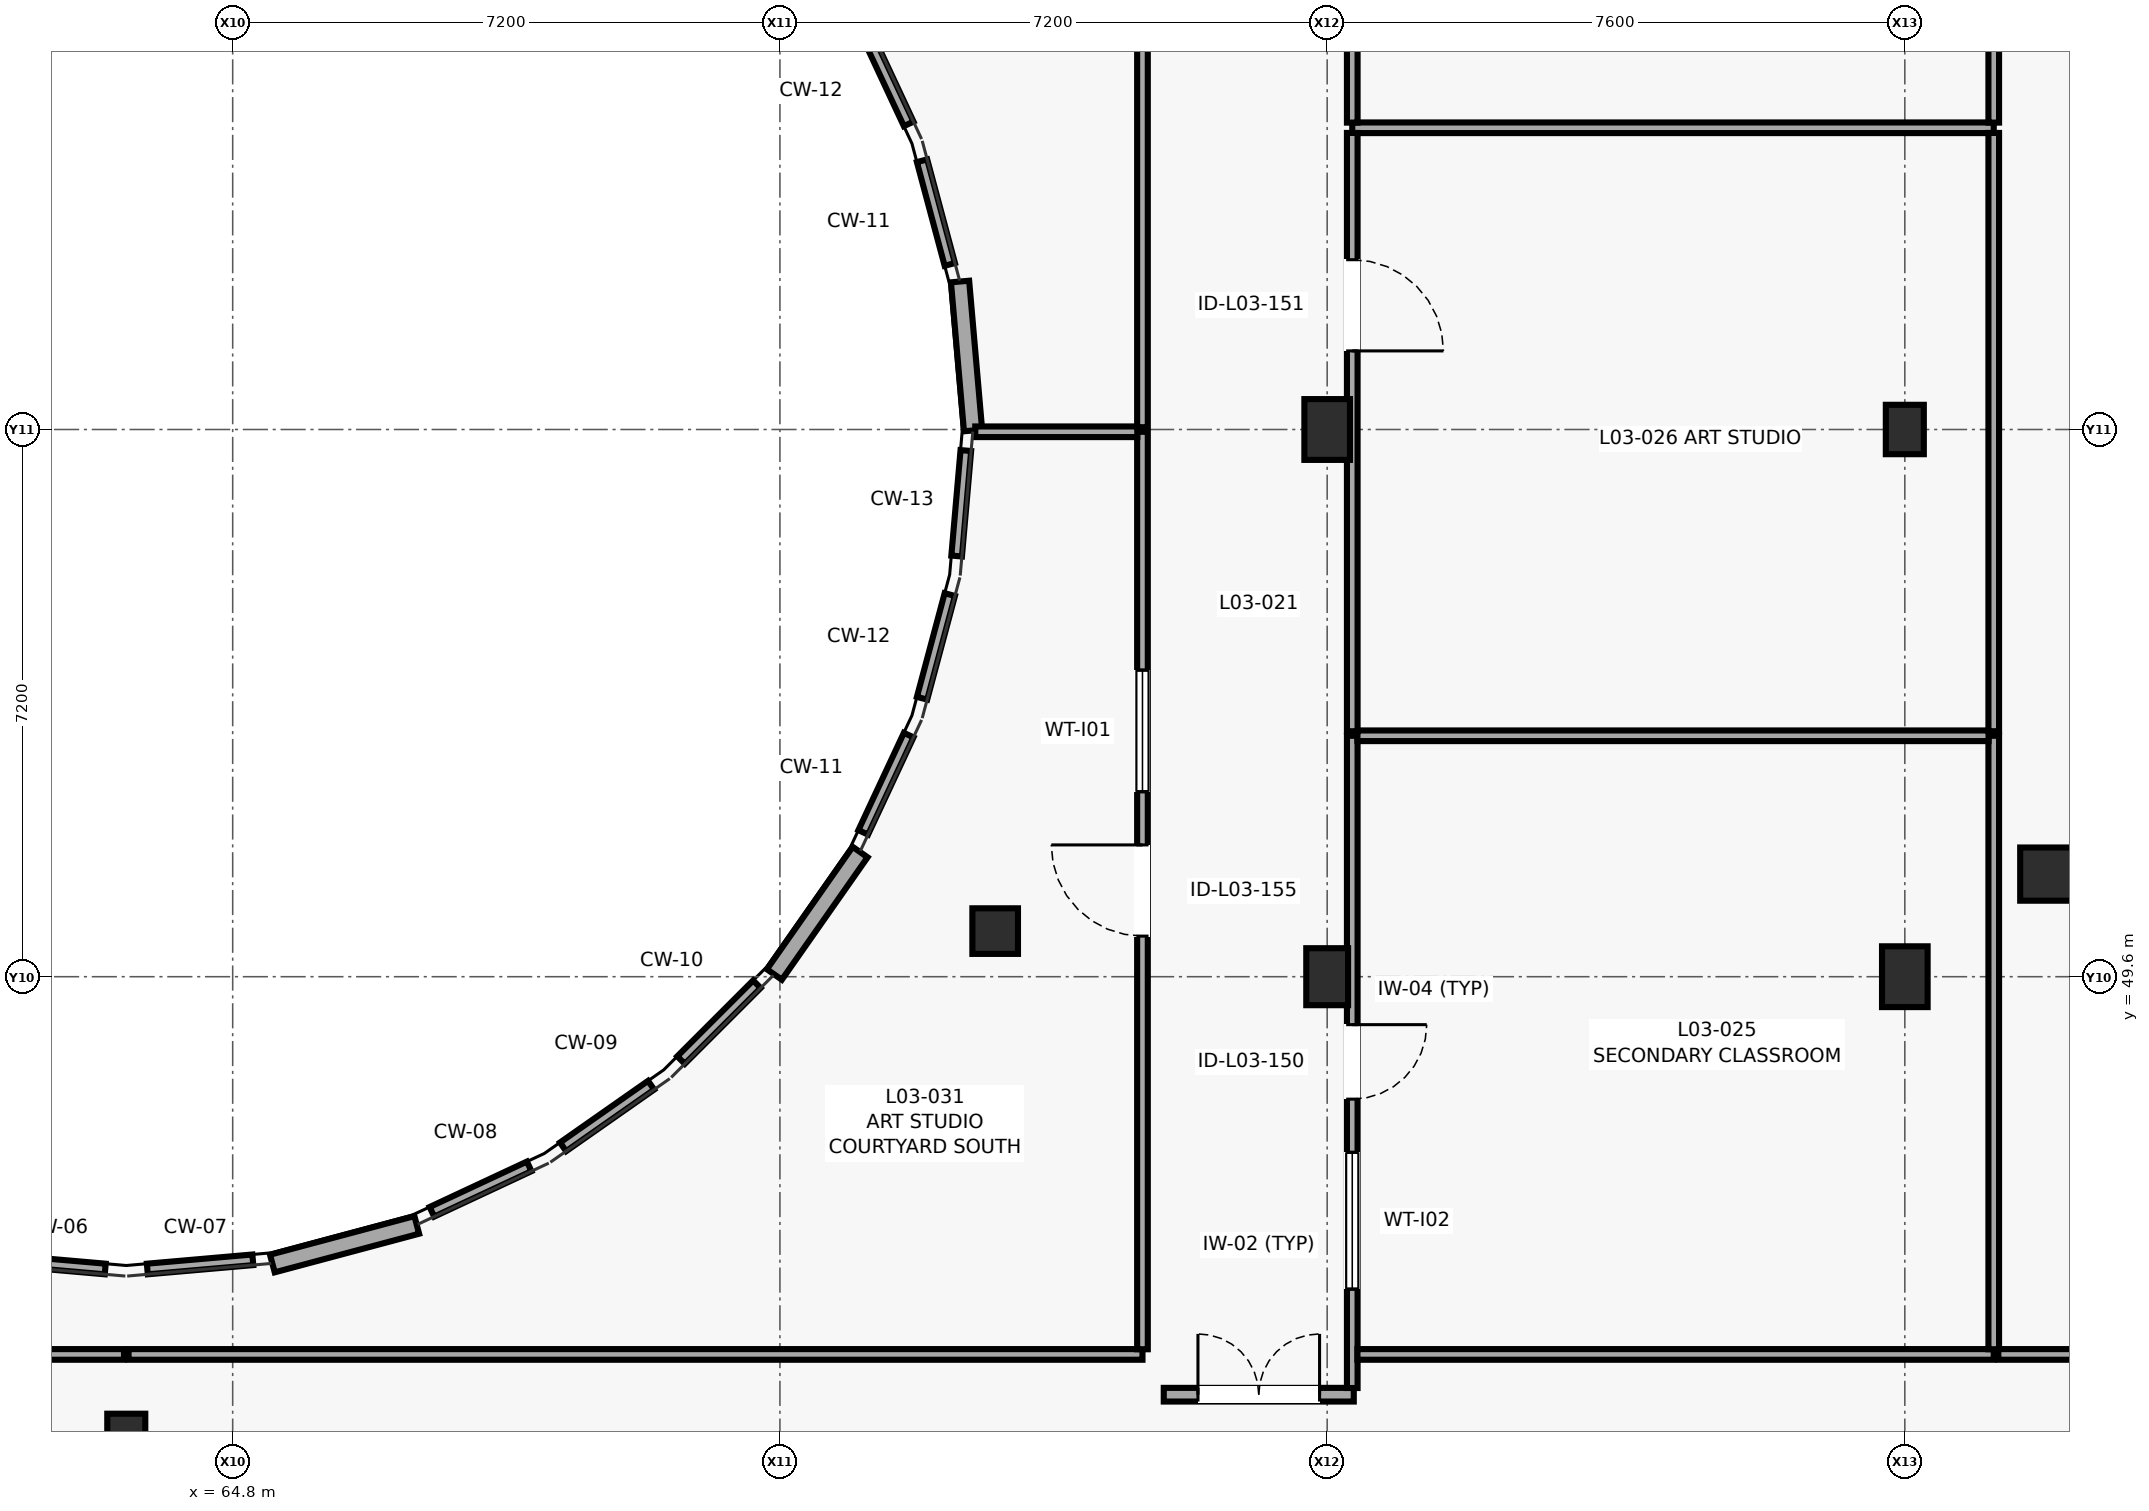
"""IFC4 building model, lengths in metres.
Left out: names, types, materials, properties, quantities, classifications, styles, units other than length and angle.
Written with IfcOpenShell. Run it as: python <this file> out.ifc"""

import sys

from ifc_helpers import new_model, si_unit, direction, frame, frame_2d, origin, origin_2d, place, context, subcontext, project, spatial, rectangle, circle, extrude, element, fill, save


model = new_model("IFC4")
c1 = context("Model", 3, precision=1e-05, world=origin(), true_north=direction((0.0, 1.0)))
c2 = subcontext(c1, "Body", "Model", "MODEL_VIEW")
j1 = project(units=[si_unit("LENGTHUNIT", "METRE"), si_unit("PLANEANGLEUNIT", "RADIAN")], contexts=[c1])
p1 = place(None, origin())
s1 = spatial("IfcSite", under=j1, at=p1, CompositionType="ELEMENT")
p2 = place(p1, origin())
s2 = spatial("IfcBuilding", under=s1, at=p2, CompositionType="ELEMENT")
p3 = place(p2, frame((0.0, 0.0, 12.2)))
s3 = spatial("IfcBuildingStorey", under=s2, at=p3, CompositionType="ELEMENT", Elevation=12.2)
p4 = place(p3, frame((63.4, 43.6, 0.0), z_axis=(0.0, 0.0, 1.0), x_axis=(1.0, 0.0, 0.0)))
e1 = element("IfcColumn", 1, at=p4, inside=s3, PredefinedType="COLUMN", context=c2, shape_type="SweptSolid", body=[
    extrude(circle(Radius=0.25, at=origin_2d()), origin(), (0.0, 0.0, 1.0), 4.0),
])
p5 = place(p3, frame((74.832, 50.2, 0.0), z_axis=(0.0, 0.0, 1.0), x_axis=(1.0, 0.0, 0.0)))
e2 = element("IfcColumn", 2, at=p5, inside=s3, PredefinedType="COLUMN", context=c2, shape_type="SweptSolid", body=[
    extrude(circle(Radius=0.3, at=origin_2d()), origin(), (0.0, 0.0, 1.0), 4.0),
])
p6 = place(p3, frame((79.2, 49.6, 0.0), z_axis=(0.0, 0.0, 1.0), x_axis=(1.0, 0.0, 0.0)))
e3 = element("IfcColumn", 3, at=p6, inside=s3, PredefinedType="COLUMN", context=c2, shape_type="SweptSolid", body=[
    extrude(rectangle(XDim=0.55, YDim=0.75, at=origin_2d()), origin(), (0.0, 0.0, 1.0), 4.0),
])
for number, where, z_axis, x_axis in (
    (4, (79.2, 56.8, 0.0), (0.0, 0.0, 1.0), (1.0, 0.0, 0.0)),
    (5, (86.8, 49.6, 0.0), (0.0, 0.0, 1.0), (1.0, 0.0, 0.0)),
):
    element("IfcColumn", number, at=place(p3, frame(where, z_axis=z_axis, x_axis=x_axis)), inside=s3, PredefinedType="COLUMN", context=c2, shape_type="SweptSolid", body=[
        extrude(rectangle(XDim=0.6, YDim=0.8, at=origin_2d()), origin(), (0.0, 0.0, 1.0), 4.0),
    ])
p7 = place(p3, frame((86.8, 56.8, 0.0), z_axis=(0.0, 0.0, 1.0), x_axis=(1.0, 0.0, 0.0)))
e6 = element("IfcColumn", 6, at=p7, inside=s3, PredefinedType="COLUMN", context=c2, shape_type="SweptSolid", body=[
    extrude(rectangle(XDim=0.5, YDim=0.65, at=origin_2d()), origin(), (0.0, 0.0, 1.0), 4.0),
])
p8 = place(p3, frame((88.668, 50.95, 0.0), z_axis=(0.0, 0.0, 1.0), x_axis=(1.0, 0.0, 0.0)))
e7 = element("IfcColumn", 7, at=p8, inside=s3, PredefinedType="COLUMN", context=c2, shape_type="SweptSolid", body=[
    extrude(circle(Radius=0.35, at=origin_2d()), origin(), (0.0, 0.0, 1.0), 4.0),
])
p9 = place(p3, frame((65.322, 45.826, 0.0), z_axis=(0.0, 0.0, 1.0), x_axis=(0.966055450051, 0.258334797167, 0.0)))
e8 = element("IfcWall", 8, at=p9, inside=s3, PredefinedType="SOLIDWALL", context=c2, shape_type="SweptSolid", body=[
    extrude(rectangle(XDim=1.967, YDim=0.24, at=frame_2d((0.983, 0.0))), origin(), (0.0, 0.0, 1.0), 3.78),
])
p10 = place(p3, frame((71.927, 49.629, 0.0), z_axis=(0.0, 0.0, 1.0), x_axis=(0.573520663092, 0.819191094316, 0.0)))
e9 = element("IfcWall", 9, at=p10, inside=s3, PredefinedType="SOLIDWALL", context=c2, shape_type="SweptSolid", body=[
    extrude(rectangle(XDim=1.967, YDim=0.24, at=frame_2d((0.983, 0.0))), origin(), (0.0, 0.0, 1.0), 3.78),
])
p11 = place(p3, frame((74.541, 56.787, 0.0), z_axis=(0.0, 0.0, 1.0), x_axis=(-0.086865228015, 0.996220072154, 0.0)))
e10 = element("IfcWall", 10, at=p11, inside=s3, PredefinedType="SOLIDWALL", context=c2, shape_type="SweptSolid", body=[
    extrude(rectangle(XDim=1.967, YDim=0.24, at=frame_2d((0.984, 0.0))), origin(), (0.0, 0.0, 1.0), 3.78),
])
p12 = place(p3, frame((77.05, 44.1, 0.0), z_axis=(0.0, 0.0, 1.0), x_axis=(1.0, 0.0, 0.0)))
e11 = element("IfcWall", 11, at=p12, inside=s3, PredefinedType="PARTITIONING", context=c2, shape_type="SweptSolid", body=[
    extrude(rectangle(XDim=2.5, YDim=0.18, at=frame_2d((1.25, 0.0))), origin(), (0.0, 0.0, 1.0), 3.78),
])
p13 = place(p12, frame((0.45, 0.0, 0.0)))
e12 = element("IfcOpeningElement", 12, at=p13, cuts=e11, PredefinedType="OPENING", context=c2, shape_type="SweptSolid", body=[
    extrude(rectangle(XDim=1.6, YDim=2.25, at=frame_2d((0.8, 1.125))), frame((0.0, 0.1, 0.0), z_axis=(0.0, -1.0, 0.0), x_axis=(1.0, 0.0, 0.0)), (0.0, 0.0, 1.0), 0.2),
])
p14 = place(p3, frame((79.53, 52.77, 0.0), z_axis=(0.0, 0.0, 1.0), x_axis=(0.0, -1.0, 0.0)))
e13 = element("IfcWall", 13, at=p14, inside=s3, PredefinedType="PARTITIONING", context=c2, shape_type="SweptSolid", body=[
    extrude(rectangle(XDim=8.582, YDim=0.14, at=frame_2d((4.291, 0.0))), origin(), (0.0, 0.0, 1.0), 3.755),
])
p15 = place(p14, frame((3.801, 0.0, 0.0)))
e14 = element("IfcOpeningElement", 14, at=p15, cuts=e13, PredefinedType="OPENING", context=c2, shape_type="SweptSolid", body=[
    extrude(rectangle(XDim=0.98, YDim=2.12, at=frame_2d((0.49, 1.06))), frame((0.0, 0.08, 0.0), z_axis=(0.0, -1.0, 0.0), x_axis=(1.0, 0.0, 0.0)), (0.0, 0.0, 1.0), 0.16),
])
p16 = place(p14, frame((5.481, 0.0, 1.05)))
e15 = element("IfcOpeningElement", 15, at=p16, cuts=e13, PredefinedType="OPENING", context=c2, shape_type="SweptSolid", body=[
    extrude(rectangle(XDim=1.8, YDim=1.2, at=frame_2d((0.9, 0.6))), frame((0.0, 0.08, 0.0), z_axis=(0.0, -1.0, 0.0), x_axis=(1.0, 0.0, 0.0)), (0.0, 0.0, 1.0), 0.16),
])
p17 = place(p3, frame((79.598, 44.63, 0.0), z_axis=(0.0, 0.0, 1.0), x_axis=(1.0, 0.0, 0.0)))
e16 = element("IfcWall", 16, at=p17, inside=s3, PredefinedType="PARTITIONING", context=c2, shape_type="SweptSolid", body=[
    extrude(rectangle(XDim=8.372, YDim=0.14, at=frame_2d((4.186, 0.0))), origin(), (0.0, 0.0, 1.0), 3.755),
])
p18 = place(p3, frame((87.97, 44.698, 0.0), z_axis=(0.0, 0.0, 1.0), x_axis=(0.0, 1.0, 0.0)))
e17 = element("IfcWall", 17, at=p18, inside=s3, PredefinedType="PARTITIONING", context=c2, shape_type="SweptSolid", body=[
    extrude(rectangle(XDim=8.072, YDim=0.14, at=frame_2d((4.036, 0.0))), origin(), (0.0, 0.0, 1.0), 3.755),
])
p19 = place(p3, frame((87.902, 52.77, 0.0), z_axis=(0.0, 0.0, 1.0), x_axis=(-1.0, 0.0, 0.0)))
e18 = element("IfcWall", 18, at=p19, inside=s3, PredefinedType="PARTITIONING", context=c2, shape_type="SweptSolid", body=[
    extrude(rectangle(XDim=8.304, YDim=0.14, at=frame_2d((4.152, 0.0))), origin(), (0.0, 0.0, 1.0), 3.755),
])
p20 = place(p3, frame((87.97, 60.77, 0.0), z_axis=(0.0, 0.0, 1.0), x_axis=(-1.0, 0.0, 0.0)))
e19 = element("IfcWall", 19, at=p20, inside=s3, PredefinedType="PARTITIONING", context=c2, shape_type="SweptSolid", body=[
    extrude(rectangle(XDim=8.44, YDim=0.14, at=frame_2d((4.22, 0.0))), origin(), (0.0, 0.0, 1.0), 3.755),
])
p21 = place(p3, frame((79.53, 60.702, 0.0), z_axis=(0.0, 0.0, 1.0), x_axis=(0.0, -1.0, 0.0)))
e20 = element("IfcWall", 20, at=p21, inside=s3, PredefinedType="PARTITIONING", context=c2, shape_type="SweptSolid", body=[
    extrude(rectangle(XDim=7.872, YDim=0.14, at=frame_2d((3.936, 0.0))), origin(), (0.0, 0.0, 1.0), 3.755),
])
p22 = place(p21, frame((1.668, 0.0, 0.0)))
e21 = element("IfcOpeningElement", 21, at=p22, cuts=e20, PredefinedType="OPENING", context=c2, shape_type="SweptSolid", body=[
    extrude(rectangle(XDim=1.2, YDim=2.15, at=frame_2d((0.6, 1.075))), frame((0.0, 0.08, 0.0), z_axis=(0.0, -1.0, 0.0), x_axis=(1.0, 0.0, 0.0)), (0.0, 0.0, 1.0), 0.16),
])
p23 = place(p3, frame((87.97, 52.83, 0.0), z_axis=(0.0, 0.0, 1.0), x_axis=(0.0, 1.0, 0.0)))
e22 = element("IfcWall", 22, at=p23, inside=s3, PredefinedType="PARTITIONING", context=c2, shape_type="SweptSolid", body=[
    extrude(rectangle(XDim=7.872, YDim=0.14, at=frame_2d((3.936, 0.0))), origin(), (0.0, 0.0, 1.0), 3.755),
])
p24 = place(p3, frame((87.97, 60.838, 0.0), z_axis=(0.0, 0.0, 1.0), x_axis=(0.0, 1.0, 0.0)))
e23 = element("IfcWall", 23, at=p24, inside=s3, PredefinedType="PARTITIONING", context=c2, shape_type="SweptSolid", body=[
    extrude(rectangle(XDim=8.132, YDim=0.14, at=frame_2d((4.066, 0.0))), origin(), (0.0, 0.0, 1.0), 3.755),
])
p25 = place(p3, frame((79.53, 68.902, 0.0), z_axis=(0.0, 0.0, 1.0), x_axis=(0.0, -1.0, 0.0)))
e24 = element("IfcWall", 24, at=p25, inside=s3, PredefinedType="PARTITIONING", context=c2, shape_type="SweptSolid", body=[
    extrude(rectangle(XDim=8.064, YDim=0.14, at=frame_2d((4.032, 0.0))), origin(), (0.0, 0.0, 1.0), 3.755),
])
p26 = place(p25, frame((2.43, 0.0, 0.0)))
e25 = element("IfcOpeningElement", 25, at=p26, cuts=e24, PredefinedType="OPENING", context=c2, shape_type="SweptSolid", body=[
    extrude(rectangle(XDim=1.12, YDim=2.18, at=frame_2d((0.56, 1.09))), frame((0.0, 0.08, 0.0), z_axis=(0.0, -1.0, 0.0), x_axis=(1.0, 0.0, 0.0)), (0.0, 0.0, 1.0), 0.16),
])
p27 = place(p3, frame((51.498, 44.63, 0.0), z_axis=(0.0, 0.0, 1.0), x_axis=(1.0, 0.0, 0.0)))
e26 = element("IfcWall", 26, at=p27, inside=s3, PredefinedType="PARTITIONING", context=c2, shape_type="SweptSolid", body=[
    extrude(rectangle(XDim=11.872, YDim=0.14, at=frame_2d((5.936, 0.0))), origin(), (0.0, 0.0, 1.0), 3.755),
])
for number, where, z_axis, x_axis in (
    (27, (63.123, 45.754, 0.0), (0.0, 0.0, 1.0), (-0.996, 0.087, 0.0)),
    (28, (65.065, 45.875, 0.0), (0.0, 0.0, 1.0), (-0.996, -0.087, 0.0)),
):
    element("IfcWall", number, at=place(p3, frame(where, z_axis=z_axis, x_axis=x_axis)), inside=s3, PredefinedType="PARTITIONING", context=c2, shape_type="SweptSolid", body=[
        extrude(rectangle(XDim=1.393, YDim=0.14, at=frame_2d((0.697, 0.0))), origin(), (0.0, 0.0, 1.0), 3.755),
    ])
p28 = place(p3, frame((63.43, 44.63, 0.0), z_axis=(0.0, 0.0, 1.0), x_axis=(1.0, 0.0, 0.0)))
e29 = element("IfcWall", 29, at=p28, inside=s3, PredefinedType="PARTITIONING", context=c2, shape_type="SweptSolid", body=[
    extrude(rectangle(XDim=13.34, YDim=0.14, at=frame_2d((6.67, 0.0))), origin(), (0.0, 0.0, 1.0), 3.755),
])
p29 = place(p3, frame((76.77, 44.698, 0.0), z_axis=(0.0, 0.0, 1.0), x_axis=(0.0, 1.0, 0.0)))
e30 = element("IfcWall", 30, at=p29, inside=s3, PredefinedType="PARTITIONING", context=c2, shape_type="SweptSolid", body=[
    extrude(rectangle(XDim=12.072, YDim=0.14, at=frame_2d((6.036, 0.0))), origin(), (0.0, 0.0, 1.0), 3.755),
])
p30 = place(p29, frame((5.436, 0.0, 0.0)))
e31 = element("IfcOpeningElement", 31, at=p30, cuts=e30, PredefinedType="OPENING", context=c2, shape_type="SweptSolid", body=[
    extrude(rectangle(XDim=1.2, YDim=2.15, at=frame_2d((0.6, 1.075))), frame((0.0, 0.08, 0.0), z_axis=(0.0, -1.0, 0.0), x_axis=(1.0, 0.0, 0.0)), (0.0, 0.0, 1.0), 0.16),
])
p31 = place(p29, frame((7.336, 0.0, 1.05)))
e32 = element("IfcOpeningElement", 32, at=p31, cuts=e30, PredefinedType="OPENING", context=c2, shape_type="SweptSolid", body=[
    extrude(rectangle(XDim=1.6, YDim=1.1, at=frame_2d((0.8, 0.55))), frame((0.0, 0.08, 0.0), z_axis=(0.0, -1.0, 0.0), x_axis=(1.0, 0.0, 0.0)), (0.0, 0.0, 1.0), 0.16),
])
p32 = place(p3, frame((76.702, 56.77, 0.0), z_axis=(0.0, 0.0, 1.0), x_axis=(-1.0, 0.0, 0.0)))
e33 = element("IfcWall", 33, at=p32, inside=s3, PredefinedType="PARTITIONING", context=c2, shape_type="SweptSolid", body=[
    extrude(rectangle(XDim=2.132, YDim=0.14, at=frame_2d((1.066, 0.0))), origin(), (0.0, 0.0, 1.0), 3.755),
])
p33 = place(p3, frame((74.446, 56.523, 0.0), z_axis=(0.0, 0.0, 1.0), x_axis=(-0.086916960031, -0.996215560037, 0.0)))
e34 = element("IfcWall", 34, at=p33, inside=s3, PredefinedType="PARTITIONING", context=c2, shape_type="SweptSolid", body=[
    extrude(rectangle(XDim=1.393, YDim=0.14, at=frame_2d((0.697, 0.0))), origin(), (0.0, 0.0, 1.0), 3.755),
])
p34 = place(p3, frame((74.235, 54.628, 0.0), z_axis=(0.0, 0.0, 1.0), x_axis=(-0.258491202719, -0.966013611766, 0.0)))
e35 = element("IfcWall", 35, at=p34, inside=s3, PredefinedType="PARTITIONING", context=c2, shape_type="SweptSolid", body=[
    extrude(rectangle(XDim=1.412, YDim=0.14, at=frame_2d((0.706, 0.0))), origin(), (0.0, 0.0, 1.0), 3.755),
])
p35 = place(p3, frame((73.694, 52.779, 0.0), z_axis=(0.0, 0.0, 1.0), x_axis=(-0.423348930736, -0.905966711775, 0.0)))
e36 = element("IfcWall", 36, at=p35, inside=s3, PredefinedType="PARTITIONING", context=c2, shape_type="SweptSolid", body=[
    extrude(rectangle(XDim=1.413, YDim=0.14, at=frame_2d((0.707, 0.0))), origin(), (0.0, 0.0, 1.0), 3.755),
])
p36 = place(p3, frame((71.697, 49.501, 0.0), z_axis=(0.0, 0.0, 1.0), x_axis=(-0.707106781187, -0.707106781187, 0.0)))
e37 = element("IfcWall", 37, at=p36, inside=s3, PredefinedType="PARTITIONING", context=c2, shape_type="SweptSolid", body=[
    extrude(rectangle(XDim=1.411, YDim=0.14, at=frame_2d((0.706, 0.0))), origin(), (0.0, 0.0, 1.0), 3.755),
])
p37 = place(p3, frame((70.305, 48.172, 0.0), z_axis=(0.0, 0.0, 1.0), x_axis=(-0.819077743108, -0.57368253481, 0.0)))
e38 = element("IfcWall", 38, at=p37, inside=s3, PredefinedType="PARTITIONING", context=c2, shape_type="SweptSolid", body=[
    extrude(rectangle(XDim=1.414, YDim=0.14, at=frame_2d((0.707, 0.0))), origin(), (0.0, 0.0, 1.0), 3.755),
])
p38 = place(p3, frame((68.701, 47.104, 0.0), z_axis=(0.0, 0.0, 1.0), x_axis=(-0.906032979506, -0.423207088844, 0.0)))
e39 = element("IfcWall", 39, at=p38, inside=s3, PredefinedType="PARTITIONING", context=c2, shape_type="SweptSolid", body=[
    extrude(rectangle(XDim=1.413, YDim=0.14, at=frame_2d((0.707, 0.0))), origin(), (0.0, 0.0, 1.0), 3.755),
])
p39 = place(p3, frame((73.87, 60.336, 0.0), z_axis=(0.0, 0.0, 1.0), x_axis=(0.258491202719, -0.966013611766, 0.0)))
e40 = element("IfcWall", 40, at=p39, inside=s3, PredefinedType="PARTITIONING", context=c2, shape_type="SweptSolid", body=[
    extrude(rectangle(XDim=1.412, YDim=0.14, at=frame_2d((0.706, 0.0))), origin(), (0.0, 0.0, 1.0), 3.755),
])
p40 = place(p3, frame((76.77, 56.83, 0.0), z_axis=(0.0, 0.0, 1.0), x_axis=(0.0, 1.0, 0.0)))
e41 = element("IfcWall", 41, at=p40, inside=s3, PredefinedType="PARTITIONING", context=c2, shape_type="SweptSolid", body=[
    extrude(rectangle(XDim=12.14, YDim=0.14, at=frame_2d((6.07, 0.0))), origin(), (0.0, 0.0, 1.0), 3.755),
])
p41 = place(p3, frame((73.096, 62.101, 0.0), z_axis=(0.0, 0.0, 1.0), x_axis=(0.423348930736, -0.905966711775, 0.0)))
e42 = element("IfcWall", 42, at=p41, inside=s3, PredefinedType="PARTITIONING", context=c2, shape_type="SweptSolid", body=[
    extrude(rectangle(XDim=1.413, YDim=0.14, at=frame_2d((0.707, 0.0))), origin(), (0.0, 0.0, 1.0), 3.755),
])
p42 = place(p3, frame((88.03, 44.63, 0.0), z_axis=(0.0, 0.0, 1.0), x_axis=(1.0, 0.0, 0.0)))
e43 = element("IfcWall", 43, at=p42, inside=s3, PredefinedType="PARTITIONING", context=c2, shape_type="SweptSolid", body=[
    extrude(rectangle(XDim=10.732, YDim=0.14, at=frame_2d((5.366, 0.0))), origin(), (0.0, 0.0, 1.0), 3.755),
])
p43 = place(p42, frame((4.826, 0.0, 0.0)))
e44 = element("IfcOpeningElement", 44, at=p43, cuts=e43, PredefinedType="OPENING", context=c2, shape_type="SweptSolid", body=[
    extrude(rectangle(XDim=1.08, YDim=2.16, at=frame_2d((0.54, 1.08))), frame((0.0, 0.08, 0.0), z_axis=(0.0, -1.0, 0.0), x_axis=(1.0, 0.0, 0.0)), (0.0, 0.0, 1.0), 0.16),
])
p44 = place(p42, frame((6.606, 0.0, 1.05)))
e45 = element("IfcOpeningElement", 45, at=p44, cuts=e43, PredefinedType="OPENING", context=c2, shape_type="SweptSolid", body=[
    extrude(rectangle(XDim=1.8, YDim=1.2, at=frame_2d((0.9, 0.6))), frame((0.0, 0.08, 0.0), z_axis=(0.0, -1.0, 0.0), x_axis=(1.0, 0.0, 0.0)), (0.0, 0.0, 1.0), 0.16),
])
p45 = place(p13, origin())
e46 = element("IfcDoor", 46, at=p45, inside=s3, OperationType="DOUBLE_DOOR_SINGLE_SWING", PredefinedType="DOOR", context=c2, shape_type="SweptSolid", body=[
    extrude(rectangle(XDim=1.6, YDim=2.25, at=frame_2d((0.8, 1.125))), frame((0.0, 0.025, 0.0), z_axis=(0.0, -1.0, 0.0), x_axis=(1.0, 0.0, 0.0)), (0.0, 0.0, 1.0), 0.05),
])
fill(e12, e46)
p46 = place(p15, origin())
e47 = element("IfcDoor", 47, at=p46, inside=s3, OperationType="SINGLE_SWING_LEFT", PredefinedType="DOOR", context=c2, shape_type="SweptSolid", body=[
    extrude(rectangle(XDim=0.98, YDim=2.12, at=frame_2d((0.49, 1.06))), frame((0.0, 0.025, 0.0), z_axis=(0.0, -1.0, 0.0), x_axis=(1.0, 0.0, 0.0)), (0.0, 0.0, 1.0), 0.05),
])
fill(e14, e47)
p47 = place(p16, origin())
e48 = element("IfcWindow", 48, at=p47, inside=s3, PartitioningType="SINGLE_PANEL", PredefinedType="WINDOW", context=c2, shape_type="SweptSolid", body=[
    extrude(rectangle(XDim=1.8, YDim=1.2, at=frame_2d((0.9, 0.6))), frame((0.0, 0.03, 0.0), z_axis=(0.0, -1.0, 0.0), x_axis=(1.0, 0.0, 0.0)), (0.0, 0.0, 1.0), 0.06),
])
fill(e15, e48)
p48 = place(p22, origin())
e49 = element("IfcDoor", 49, at=p48, inside=s3, OperationType="SINGLE_SWING_RIGHT", PredefinedType="DOOR", context=c2, shape_type="SweptSolid", body=[
    extrude(rectangle(XDim=1.2, YDim=2.15, at=frame_2d((0.6, 1.075))), frame((0.0, 0.025, 0.0), z_axis=(0.0, -1.0, 0.0), x_axis=(1.0, 0.0, 0.0)), (0.0, 0.0, 1.0), 0.05),
])
fill(e21, e49)
p49 = place(p30, origin())
e50 = element("IfcDoor", 50, at=p49, inside=s3, OperationType="SINGLE_SWING_RIGHT", PredefinedType="DOOR", context=c2, shape_type="SweptSolid", body=[
    extrude(rectangle(XDim=1.2, YDim=2.15, at=frame_2d((0.6, 1.075))), frame((0.0, 0.025, 0.0), z_axis=(0.0, -1.0, 0.0), x_axis=(1.0, 0.0, 0.0)), (0.0, 0.0, 1.0), 0.05),
])
fill(e31, e50)
p50 = place(p31, origin())
e51 = element("IfcWindow", 51, at=p50, inside=s3, PartitioningType="SINGLE_PANEL", PredefinedType="WINDOW", context=c2, shape_type="SweptSolid", body=[
    extrude(rectangle(XDim=1.6, YDim=1.1, at=frame_2d((0.8, 0.55))), frame((0.0, 0.03, 0.0), z_axis=(0.0, -1.0, 0.0), x_axis=(1.0, 0.0, 0.0)), (0.0, 0.0, 1.0), 0.06),
])
fill(e32, e51)
save(model, sys.argv[1])
